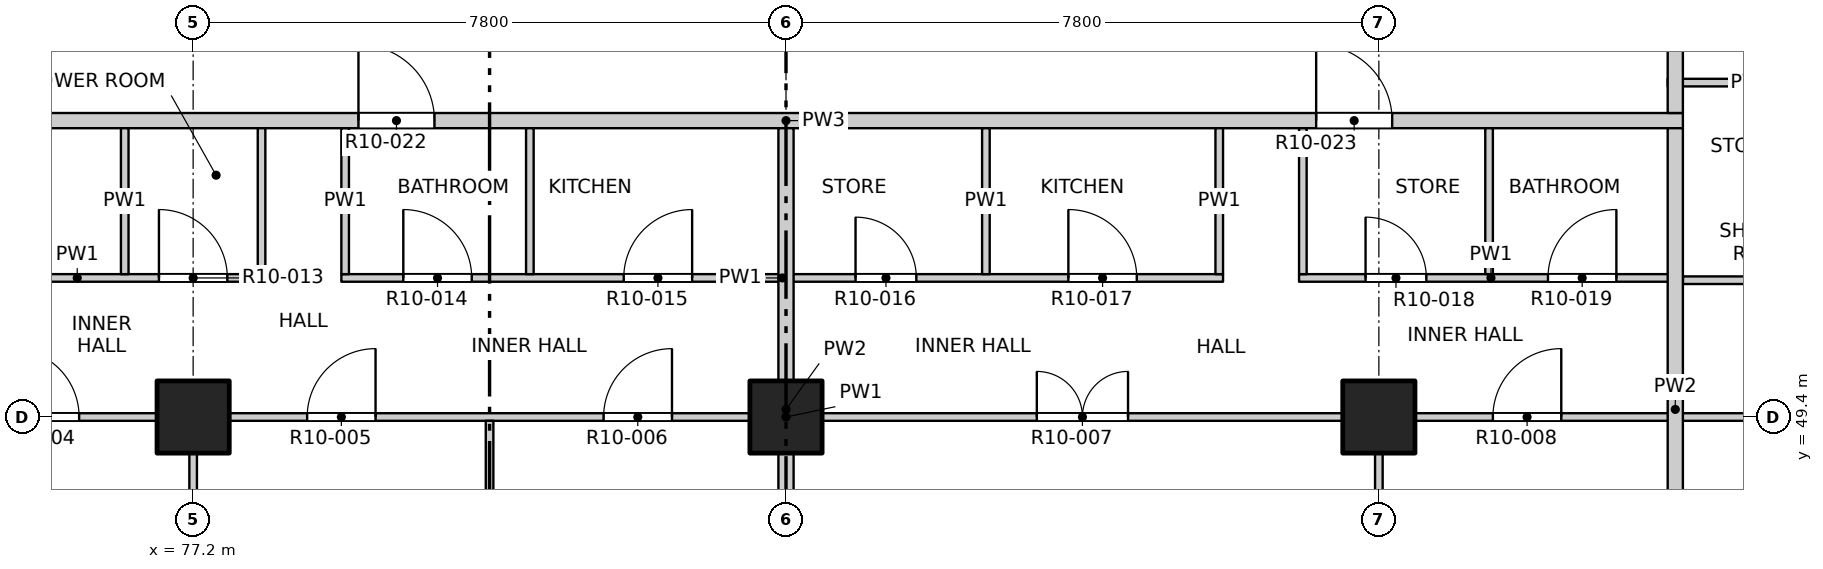
"""IFC4 building model, lengths in metres.
Left out: names, types, materials, properties, quantities, classifications, styles, units other than length and angle.
Written with IfcOpenShell. Run it as: python <this file> out.ifc"""

import sys

from ifc_helpers import new_model, si_unit, direction, frame, frame_2d, origin, origin_2d, place, context, subcontext, project, spatial, rectangle, extrude, element, fill, save


model = new_model("IFC4")
c1 = context("Model", 3, precision=1e-05, world=origin(), true_north=direction((0.0, 1.0)))
c2 = subcontext(c1, "Body", "Model", "MODEL_VIEW")
j1 = project(units=[si_unit("LENGTHUNIT", "METRE"), si_unit("PLANEANGLEUNIT", "RADIAN")], contexts=[c1])
p1 = place(None, origin())
s1 = spatial("IfcSite", under=j1, at=p1, CompositionType="ELEMENT")
p2 = place(p1, origin())
s2 = spatial("IfcBuilding", under=s1, at=p2, CompositionType="ELEMENT")
p3 = place(p2, frame((0.0, 0.0, 123.7)))
s3 = spatial("IfcBuildingStorey", under=s2, at=p3, CompositionType="ELEMENT", Elevation=123.7)
for number, where, z_axis, x_axis in (
    (1, (77.2, 49.4, -0.3), (0.0, 0.0, 1.0), (1.0, 0.0, 0.0)),
    (2, (85.0, 49.4, -0.3), (0.0, 0.0, 1.0), (1.0, 0.0, 0.0)),
    (3, (92.8, 49.4, -0.3), (0.0, 0.0, 1.0), (1.0, 0.0, 0.0)),
):
    element("IfcColumn", number, at=place(p3, frame(where, z_axis=z_axis, x_axis=x_axis)), inside=s3, PredefinedType="COLUMN", context=c2, shape_type="SweptSolid", body=[
        extrude(rectangle(XDim=0.95, YDim=0.95, at=origin_2d()), origin(), (0.0, 0.0, 1.0), 3.45),
    ])
p4 = place(p3, frame((65.8, 49.4, 0.0), z_axis=(0.0, 0.0, 1.0), x_axis=(1.0, 0.0, 0.0)))
e4 = element("IfcWall", 4, at=p4, inside=s3, PredefinedType="PARTITIONING", context=c2, shape_type="SweptSolid", body=[
    extrude(rectangle(XDim=38.4, YDim=0.1, at=frame_2d((19.2, 0.0))), origin(), (0.0, 0.0, 1.0), 3.15),
])
p5 = place(p4, frame((4.19, 0.0, 0.0)))
e5 = element("IfcOpeningElement", 5, at=p5, cuts=e4, PredefinedType="OPENING", context=c2, shape_type="SweptSolid", body=[
    extrude(rectangle(XDim=0.9, YDim=2.1, at=frame_2d((0.45, 1.05))), frame((0.0, 0.06, 0.0), z_axis=(0.0, -1.0, 0.0), x_axis=(1.0, 0.0, 0.0)), (0.0, 0.0, 1.0), 0.12),
])
p6 = place(p4, frame((9.0, 0.0, 0.0)))
e6 = element("IfcOpeningElement", 6, at=p6, cuts=e4, PredefinedType="OPENING", context=c2, shape_type="SweptSolid", body=[
    extrude(rectangle(XDim=0.9, YDim=2.1, at=frame_2d((0.45, 1.05))), frame((0.0, 0.06, 0.0), z_axis=(0.0, -1.0, 0.0), x_axis=(1.0, 0.0, 0.0)), (0.0, 0.0, 1.0), 0.12),
])
p7 = place(p4, frame((12.9, 0.0, 0.0)))
e7 = element("IfcOpeningElement", 7, at=p7, cuts=e4, PredefinedType="OPENING", context=c2, shape_type="SweptSolid", body=[
    extrude(rectangle(XDim=0.9, YDim=2.1, at=frame_2d((0.45, 1.05))), frame((0.0, 0.06, 0.0), z_axis=(0.0, -1.0, 0.0), x_axis=(1.0, 0.0, 0.0)), (0.0, 0.0, 1.0), 0.12),
])
p8 = place(p4, frame((16.8, 0.0, 0.0)))
e8 = element("IfcOpeningElement", 8, at=p8, cuts=e4, PredefinedType="OPENING", context=c2, shape_type="SweptSolid", body=[
    extrude(rectangle(XDim=0.9, YDim=2.1, at=frame_2d((0.45, 1.05))), frame((0.0, 0.06, 0.0), z_axis=(0.0, -1.0, 0.0), x_axis=(1.0, 0.0, 0.0)), (0.0, 0.0, 1.0), 0.12),
])
p9 = place(p4, frame((22.5, 0.0, 0.0)))
e9 = element("IfcOpeningElement", 9, at=p9, cuts=e4, PredefinedType="OPENING", context=c2, shape_type="SweptSolid", body=[
    extrude(rectangle(XDim=1.2, YDim=2.1, at=frame_2d((0.6, 1.05))), frame((0.0, 0.06, 0.0), z_axis=(0.0, -1.0, 0.0), x_axis=(1.0, 0.0, 0.0)), (0.0, 0.0, 1.0), 0.12),
])
p10 = place(p4, frame((28.5, 0.0, 0.0)))
e10 = element("IfcOpeningElement", 10, at=p10, cuts=e4, PredefinedType="OPENING", context=c2, shape_type="SweptSolid", body=[
    extrude(rectangle(XDim=0.9, YDim=2.1, at=frame_2d((0.45, 1.05))), frame((0.0, 0.06, 0.0), z_axis=(0.0, -1.0, 0.0), x_axis=(1.0, 0.0, 0.0)), (0.0, 0.0, 1.0), 0.12),
])
p11 = place(p4, frame((33.31, 0.0, 0.0)))
e11 = element("IfcOpeningElement", 11, at=p11, cuts=e4, PredefinedType="OPENING", context=c2, shape_type="SweptSolid", body=[
    extrude(rectangle(XDim=0.9, YDim=2.1, at=frame_2d((0.45, 1.05))), frame((0.0, 0.06, 0.0), z_axis=(0.0, -1.0, 0.0), x_axis=(1.0, 0.0, 0.0)), (0.0, 0.0, 1.0), 0.12),
])
p12 = place(p3, frame((96.8, 51.2, 0.0), z_axis=(0.0, 0.0, 1.0), x_axis=(1.0, 0.0, 0.0)))
e12 = element("IfcWall", 12, at=p12, inside=s3, PredefinedType="PARTITIONING", context=c2, shape_type="SweptSolid", body=[
    extrude(rectangle(XDim=2.02, YDim=0.1, at=frame_2d((1.01, 0.0))), origin(), (0.0, 0.0, 1.0), 3.15),
])
p13 = place(p3, frame((73.2, 51.23, 0.0), z_axis=(0.0, 0.0, 1.0), x_axis=(1.0, 0.0, 0.0)))
e13 = element("IfcWall", 13, at=p13, inside=s3, PredefinedType="PARTITIONING", context=c2, shape_type="SweptSolid", body=[
    extrude(rectangle(XDim=4.95, YDim=0.1, at=frame_2d((2.475, 0.0))), origin(), (0.0, 0.0, 1.0), 3.15),
])
p14 = place(p13, frame((1.2, 0.0, 0.0)))
e14 = element("IfcOpeningElement", 14, at=p14, cuts=e13, PredefinedType="OPENING", context=c2, shape_type="SweptSolid", body=[
    extrude(rectangle(XDim=0.8, YDim=2.1, at=frame_2d((0.4, 1.05))), frame((0.0, 0.06, 0.0), z_axis=(0.0, -1.0, 0.0), x_axis=(1.0, 0.0, 0.0)), (0.0, 0.0, 1.0), 0.12),
])
p15 = place(p13, frame((3.55, 0.0, 0.0)))
e15 = element("IfcOpeningElement", 15, at=p15, cuts=e13, PredefinedType="OPENING", context=c2, shape_type="SweptSolid", body=[
    extrude(rectangle(XDim=0.9, YDim=2.1, at=frame_2d((0.45, 1.05))), frame((0.0, 0.06, 0.0), z_axis=(0.0, -1.0, 0.0), x_axis=(1.0, 0.0, 0.0)), (0.0, 0.0, 1.0), 0.12),
])
p16 = place(p3, frame((79.15, 51.23, 0.0), z_axis=(0.0, 0.0, 1.0), x_axis=(1.0, 0.0, 0.0)))
e16 = element("IfcWall", 16, at=p16, inside=s3, PredefinedType="PARTITIONING", context=c2, shape_type="SweptSolid", body=[
    extrude(rectangle(XDim=11.6, YDim=0.1, at=frame_2d((5.8, 0.0))), origin(), (0.0, 0.0, 1.0), 3.15),
])
p17 = place(p16, frame((0.815, 0.0, 0.0)))
e17 = element("IfcOpeningElement", 17, at=p17, cuts=e16, PredefinedType="OPENING", context=c2, shape_type="SweptSolid", body=[
    extrude(rectangle(XDim=0.9, YDim=2.1, at=frame_2d((0.45, 1.05))), frame((0.0, 0.06, 0.0), z_axis=(0.0, -1.0, 0.0), x_axis=(1.0, 0.0, 0.0)), (0.0, 0.0, 1.0), 0.12),
])
p18 = place(p16, frame((3.715, 0.0, 0.0)))
e18 = element("IfcOpeningElement", 18, at=p18, cuts=e16, PredefinedType="OPENING", context=c2, shape_type="SweptSolid", body=[
    extrude(rectangle(XDim=0.9, YDim=2.1, at=frame_2d((0.45, 1.05))), frame((0.0, 0.06, 0.0), z_axis=(0.0, -1.0, 0.0), x_axis=(1.0, 0.0, 0.0)), (0.0, 0.0, 1.0), 0.12),
])
p19 = place(p16, frame((6.765, 0.0, 0.0)))
e19 = element("IfcOpeningElement", 19, at=p19, cuts=e16, PredefinedType="OPENING", context=c2, shape_type="SweptSolid", body=[
    extrude(rectangle(XDim=0.8, YDim=2.1, at=frame_2d((0.4, 1.05))), frame((0.0, 0.06, 0.0), z_axis=(0.0, -1.0, 0.0), x_axis=(1.0, 0.0, 0.0)), (0.0, 0.0, 1.0), 0.12),
])
p20 = place(p16, frame((9.565, 0.0, 0.0)))
e20 = element("IfcOpeningElement", 20, at=p20, cuts=e16, PredefinedType="OPENING", context=c2, shape_type="SweptSolid", body=[
    extrude(rectangle(XDim=0.9, YDim=2.1, at=frame_2d((0.45, 1.05))), frame((0.0, 0.06, 0.0), z_axis=(0.0, -1.0, 0.0), x_axis=(1.0, 0.0, 0.0)), (0.0, 0.0, 1.0), 0.12),
])
p21 = place(p3, frame((91.75, 51.23, 0.0), z_axis=(0.0, 0.0, 1.0), x_axis=(1.0, 0.0, 0.0)))
e21 = element("IfcWall", 21, at=p21, inside=s3, PredefinedType="PARTITIONING", context=c2, shape_type="SweptSolid", body=[
    extrude(rectangle(XDim=5.05, YDim=0.1, at=frame_2d((2.525, 0.0))), origin(), (0.0, 0.0, 1.0), 3.15),
])
p22 = place(p21, frame((0.875, 0.0, 0.0)))
e22 = element("IfcOpeningElement", 22, at=p22, cuts=e21, PredefinedType="OPENING", context=c2, shape_type="SweptSolid", body=[
    extrude(rectangle(XDim=0.8, YDim=2.1, at=frame_2d((0.4, 1.05))), frame((0.0, 0.06, 0.0), z_axis=(0.0, -1.0, 0.0), x_axis=(1.0, 0.0, 0.0)), (0.0, 0.0, 1.0), 0.12),
])
p23 = place(p21, frame((3.275, 0.0, 0.0)))
e23 = element("IfcOpeningElement", 23, at=p23, cuts=e21, PredefinedType="OPENING", context=c2, shape_type="SweptSolid", body=[
    extrude(rectangle(XDim=0.9, YDim=2.1, at=frame_2d((0.45, 1.05))), frame((0.0, 0.06, 0.0), z_axis=(0.0, -1.0, 0.0), x_axis=(1.0, 0.0, 0.0)), (0.0, 0.0, 1.0), 0.12),
])
p24 = place(p3, frame((73.2, 53.3, 0.0), z_axis=(0.0, 0.0, 1.0), x_axis=(1.0, 0.0, 0.0)))
e24 = element("IfcWall", 24, at=p24, inside=s3, PredefinedType="PARTITIONING", context=c2, shape_type="SweptSolid", body=[
    extrude(rectangle(XDim=23.6, YDim=0.2, at=frame_2d((11.8, 0.0))), origin(), (0.0, 0.0, 1.0), 3.15),
])
p25 = place(p24, frame((6.175, 0.0, 0.0)))
e25 = element("IfcOpeningElement", 25, at=p25, cuts=e24, PredefinedType="OPENING", context=c2, shape_type="SweptSolid", body=[
    extrude(rectangle(XDim=1.0, YDim=2.1, at=frame_2d((0.5, 1.05))), frame((0.0, 0.11, 0.0), z_axis=(0.0, -1.0, 0.0), x_axis=(1.0, 0.0, 0.0)), (0.0, 0.0, 1.0), 0.22),
])
p26 = place(p24, frame((18.775, 0.0, 0.0)))
e26 = element("IfcOpeningElement", 26, at=p26, cuts=e24, PredefinedType="OPENING", context=c2, shape_type="SweptSolid", body=[
    extrude(rectangle(XDim=1.0, YDim=2.1, at=frame_2d((0.5, 1.05))), frame((0.0, 0.11, 0.0), z_axis=(0.0, -1.0, 0.0), x_axis=(1.0, 0.0, 0.0)), (0.0, 0.0, 1.0), 0.22),
])
p27 = place(p3, frame((96.6, 53.8, 0.0), z_axis=(0.0, 0.0, 1.0), x_axis=(1.0, 0.0, 0.0)))
e27 = element("IfcWall", 27, at=p27, inside=s3, PredefinedType="PARTITIONING", context=c2, shape_type="SweptSolid", body=[
    extrude(rectangle(XDim=2.22, YDim=0.1, at=frame_2d((1.11, 0.0))), origin(), (0.0, 0.0, 1.0), 3.15),
])
p28 = place(p3, frame((76.3, 51.28, 0.0), z_axis=(0.0, 0.0, 1.0), x_axis=(0.0, 1.0, 0.0)))
e28 = element("IfcWall", 28, at=p28, inside=s3, PredefinedType="PARTITIONING", context=c2, shape_type="SweptSolid", body=[
    extrude(rectangle(XDim=1.92, YDim=0.1, at=frame_2d((0.96, 0.0))), origin(), (0.0, 0.0, 1.0), 3.15),
])
p29 = place(p3, frame((77.2, 45.8, 0.0), z_axis=(0.0, 0.0, 1.0), x_axis=(0.0, 1.0, 0.0)))
e29 = element("IfcWall", 29, at=p29, inside=s3, PredefinedType="PARTITIONING", context=c2, shape_type="SweptSolid", body=[
    extrude(rectangle(XDim=3.55, YDim=0.1, at=frame_2d((1.775, 0.0))), origin(), (0.0, 0.0, 1.0), 3.15),
])
for number, where, z_axis, x_axis in (
    (30, (78.1, 51.28, 0.0), (0.0, 0.0, 1.0), (0.0, 1.0, 0.0)),
    (31, (79.2, 51.28, 0.0), (0.0, 0.0, 1.0), (0.0, 1.0, 0.0)),
):
    element("IfcWall", number, at=place(p3, frame(where, z_axis=z_axis, x_axis=x_axis)), inside=s3, PredefinedType="PARTITIONING", context=c2, shape_type="SweptSolid", body=[
        extrude(rectangle(XDim=1.92, YDim=0.1, at=frame_2d((0.96, 0.0))), origin(), (0.0, 0.0, 1.0), 3.15),
    ])
p30 = place(p3, frame((81.1, 45.8, 0.0), z_axis=(0.0, 0.0, 1.0), x_axis=(0.0, 1.0, 0.0)))
e32 = element("IfcWall", 32, at=p30, inside=s3, PredefinedType="PARTITIONING", context=c2, shape_type="SweptSolid", body=[
    extrude(rectangle(XDim=3.55, YDim=0.1, at=frame_2d((1.775, 0.0))), origin(), (0.0, 0.0, 1.0), 3.15),
])
p31 = place(p3, frame((81.63, 51.28, 0.0), z_axis=(0.0, 0.0, 1.0), x_axis=(0.0, 1.0, 0.0)))
e33 = element("IfcWall", 33, at=p31, inside=s3, PredefinedType="PARTITIONING", context=c2, shape_type="SweptSolid", body=[
    extrude(rectangle(XDim=1.92, YDim=0.1, at=frame_2d((0.96, 0.0))), origin(), (0.0, 0.0, 1.0), 3.15),
])
p32 = place(p3, frame((85.0, 45.8, 0.0), z_axis=(0.0, 0.0, 1.0), x_axis=(0.0, 1.0, 0.0)))
e34 = element("IfcWall", 34, at=p32, inside=s3, PredefinedType="PARTITIONING", context=c2, shape_type="SweptSolid", body=[
    extrude(rectangle(XDim=7.4, YDim=0.2, at=frame_2d((3.7, 0.0))), origin(), (0.0, 0.0, 1.0), 3.15),
])
for number, where, z_axis, x_axis in (
    (35, (87.63, 51.28, 0.0), (0.0, 0.0, 1.0), (0.0, 1.0, 0.0)),
    (36, (90.7, 51.28, 0.0), (0.0, 0.0, 1.0), (0.0, 1.0, 0.0)),
    (37, (91.8, 51.28, 0.0), (0.0, 0.0, 1.0), (0.0, 1.0, 0.0)),
):
    element("IfcWall", number, at=place(p3, frame(where, z_axis=z_axis, x_axis=x_axis)), inside=s3, PredefinedType="PARTITIONING", context=c2, shape_type="SweptSolid", body=[
        extrude(rectangle(XDim=1.92, YDim=0.1, at=frame_2d((0.96, 0.0))), origin(), (0.0, 0.0, 1.0), 3.15),
    ])
p33 = place(p3, frame((92.8, 45.8, 0.0), z_axis=(0.0, 0.0, 1.0), x_axis=(0.0, 1.0, 0.0)))
e38 = element("IfcWall", 38, at=p33, inside=s3, PredefinedType="PARTITIONING", context=c2, shape_type="SweptSolid", body=[
    extrude(rectangle(XDim=3.55, YDim=0.1, at=frame_2d((1.775, 0.0))), origin(), (0.0, 0.0, 1.0), 3.15),
])
p34 = place(p3, frame((94.25, 51.28, 0.0), z_axis=(0.0, 0.0, 1.0), x_axis=(0.0, 1.0, 0.0)))
e39 = element("IfcWall", 39, at=p34, inside=s3, PredefinedType="PARTITIONING", context=c2, shape_type="SweptSolid", body=[
    extrude(rectangle(XDim=1.92, YDim=0.1, at=frame_2d((0.96, 0.0))), origin(), (0.0, 0.0, 1.0), 3.15),
])
p35 = place(p3, frame((96.7, 45.8, 0.0), z_axis=(0.0, 0.0, 1.0), x_axis=(0.0, 1.0, 0.0)))
e40 = element("IfcWall", 40, at=p35, inside=s3, PredefinedType="PARTITIONING", context=c2, shape_type="SweptSolid", body=[
    extrude(rectangle(XDim=7.4, YDim=0.2, at=frame_2d((3.7, 0.0))), origin(), (0.0, 0.0, 1.0), 3.15),
])
p36 = place(p3, frame((96.7, 53.4, 0.0), z_axis=(0.0, 0.0, 1.0), x_axis=(0.0, 1.0, 0.0)))
e41 = element("IfcWall", 41, at=p36, inside=s3, PredefinedType="PARTITIONING", context=c2, shape_type="SweptSolid", body=[
    extrude(rectangle(XDim=30.8, YDim=0.2, at=frame_2d((15.4, 0.0))), origin(), (0.0, 0.0, 1.0), 3.15),
])
p37 = place(p36, frame((9.725, 0.0, 0.0)))
e42 = element("IfcOpeningElement", 42, at=p37, cuts=e41, PredefinedType="OPENING", context=c2, shape_type="SweptSolid", body=[
    extrude(rectangle(XDim=1.0, YDim=2.1, at=frame_2d((0.5, 1.05))), frame((0.0, 0.11, 0.0), z_axis=(0.0, -1.0, 0.0), x_axis=(1.0, 0.0, 0.0)), (0.0, 0.0, 1.0), 0.22),
])
p38 = place(p36, frame((14.775, 0.0, 0.0)))
e43 = element("IfcOpeningElement", 43, at=p38, cuts=e41, PredefinedType="OPENING", context=c2, shape_type="SweptSolid", body=[
    extrude(rectangle(XDim=1.0, YDim=2.1, at=frame_2d((0.5, 1.05))), frame((0.0, 0.11, 0.0), z_axis=(0.0, -1.0, 0.0), x_axis=(1.0, 0.0, 0.0)), (0.0, 0.0, 1.0), 0.22),
])
p39 = place(p6, origin())
e44 = element("IfcDoor", 44, at=p39, inside=s3, OperationType="SINGLE_SWING_LEFT", PredefinedType="DOOR", context=c2, shape_type="SweptSolid", body=[
    extrude(rectangle(XDim=0.9, YDim=2.1, at=frame_2d((0.45, 1.05))), frame((0.0, 0.025, 0.0), z_axis=(0.0, -1.0, 0.0), x_axis=(1.0, 0.0, 0.0)), (0.0, 0.0, 1.0), 0.05),
])
fill(e6, e44)
p40 = place(p7, origin())
e45 = element("IfcDoor", 45, at=p40, inside=s3, OperationType="SINGLE_SWING_RIGHT", PredefinedType="DOOR", context=c2, shape_type="SweptSolid", body=[
    extrude(rectangle(XDim=0.9, YDim=2.1, at=frame_2d((0.45, 1.05))), frame((0.0, 0.025, 0.0), z_axis=(0.0, -1.0, 0.0), x_axis=(1.0, 0.0, 0.0)), (0.0, 0.0, 1.0), 0.05),
])
fill(e7, e45)
p41 = place(p8, origin())
e46 = element("IfcDoor", 46, at=p41, inside=s3, OperationType="SINGLE_SWING_RIGHT", PredefinedType="DOOR", context=c2, shape_type="SweptSolid", body=[
    extrude(rectangle(XDim=0.9, YDim=2.1, at=frame_2d((0.45, 1.05))), frame((0.0, 0.025, 0.0), z_axis=(0.0, -1.0, 0.0), x_axis=(1.0, 0.0, 0.0)), (0.0, 0.0, 1.0), 0.05),
])
fill(e8, e46)
p42 = place(p9, origin())
e47 = element("IfcDoor", 47, at=p42, inside=s3, OperationType="DOUBLE_DOOR_SINGLE_SWING", PredefinedType="DOOR", context=c2, shape_type="SweptSolid", body=[
    extrude(rectangle(XDim=1.2, YDim=2.1, at=frame_2d((0.6, 1.05))), frame((0.0, 0.025, 0.0), z_axis=(0.0, -1.0, 0.0), x_axis=(1.0, 0.0, 0.0)), (0.0, 0.0, 1.0), 0.05),
])
fill(e9, e47)
p43 = place(p10, origin())
e48 = element("IfcDoor", 48, at=p43, inside=s3, OperationType="SINGLE_SWING_RIGHT", PredefinedType="DOOR", context=c2, shape_type="SweptSolid", body=[
    extrude(rectangle(XDim=0.9, YDim=2.1, at=frame_2d((0.45, 1.05))), frame((0.0, 0.025, 0.0), z_axis=(0.0, -1.0, 0.0), x_axis=(1.0, 0.0, 0.0)), (0.0, 0.0, 1.0), 0.05),
])
fill(e10, e48)
p44 = place(p15, origin())
e49 = element("IfcDoor", 49, at=p44, inside=s3, OperationType="SINGLE_SWING_LEFT", PredefinedType="DOOR", context=c2, shape_type="SweptSolid", body=[
    extrude(rectangle(XDim=0.9, YDim=2.1, at=frame_2d((0.45, 1.05))), frame((0.0, 0.025, 0.0), z_axis=(0.0, -1.0, 0.0), x_axis=(1.0, 0.0, 0.0)), (0.0, 0.0, 1.0), 0.05),
])
fill(e15, e49)
p45 = place(p17, origin())
e50 = element("IfcDoor", 50, at=p45, inside=s3, OperationType="SINGLE_SWING_LEFT", PredefinedType="DOOR", context=c2, shape_type="SweptSolid", body=[
    extrude(rectangle(XDim=0.9, YDim=2.1, at=frame_2d((0.45, 1.05))), frame((0.0, 0.025, 0.0), z_axis=(0.0, -1.0, 0.0), x_axis=(1.0, 0.0, 0.0)), (0.0, 0.0, 1.0), 0.05),
])
fill(e17, e50)
p46 = place(p18, origin())
e51 = element("IfcDoor", 51, at=p46, inside=s3, OperationType="SINGLE_SWING_RIGHT", PredefinedType="DOOR", context=c2, shape_type="SweptSolid", body=[
    extrude(rectangle(XDim=0.9, YDim=2.1, at=frame_2d((0.45, 1.05))), frame((0.0, 0.025, 0.0), z_axis=(0.0, -1.0, 0.0), x_axis=(1.0, 0.0, 0.0)), (0.0, 0.0, 1.0), 0.05),
])
fill(e18, e51)
p47 = place(p19, origin())
e52 = element("IfcDoor", 52, at=p47, inside=s3, OperationType="SINGLE_SWING_LEFT", PredefinedType="DOOR", context=c2, shape_type="SweptSolid", body=[
    extrude(rectangle(XDim=0.8, YDim=2.1, at=frame_2d((0.4, 1.05))), frame((0.0, 0.025, 0.0), z_axis=(0.0, -1.0, 0.0), x_axis=(1.0, 0.0, 0.0)), (0.0, 0.0, 1.0), 0.05),
])
fill(e19, e52)
p48 = place(p20, origin())
e53 = element("IfcDoor", 53, at=p48, inside=s3, OperationType="SINGLE_SWING_LEFT", PredefinedType="DOOR", context=c2, shape_type="SweptSolid", body=[
    extrude(rectangle(XDim=0.9, YDim=2.1, at=frame_2d((0.45, 1.05))), frame((0.0, 0.025, 0.0), z_axis=(0.0, -1.0, 0.0), x_axis=(1.0, 0.0, 0.0)), (0.0, 0.0, 1.0), 0.05),
])
fill(e20, e53)
p49 = place(p22, origin())
e54 = element("IfcDoor", 54, at=p49, inside=s3, OperationType="SINGLE_SWING_LEFT", PredefinedType="DOOR", context=c2, shape_type="SweptSolid", body=[
    extrude(rectangle(XDim=0.8, YDim=2.1, at=frame_2d((0.4, 1.05))), frame((0.0, 0.025, 0.0), z_axis=(0.0, -1.0, 0.0), x_axis=(1.0, 0.0, 0.0)), (0.0, 0.0, 1.0), 0.05),
])
fill(e22, e54)
p50 = place(p23, origin())
e55 = element("IfcDoor", 55, at=p50, inside=s3, OperationType="SINGLE_SWING_RIGHT", PredefinedType="DOOR", context=c2, shape_type="SweptSolid", body=[
    extrude(rectangle(XDim=0.9, YDim=2.1, at=frame_2d((0.45, 1.05))), frame((0.0, 0.025, 0.0), z_axis=(0.0, -1.0, 0.0), x_axis=(1.0, 0.0, 0.0)), (0.0, 0.0, 1.0), 0.05),
])
fill(e23, e55)
p51 = place(p25, origin())
e56 = element("IfcDoor", 56, at=p51, inside=s3, OperationType="SINGLE_SWING_LEFT", PredefinedType="DOOR", context=c2, shape_type="SweptSolid", body=[
    extrude(rectangle(XDim=1.0, YDim=2.1, at=frame_2d((0.5, 1.05))), frame((0.0, 0.025, 0.0), z_axis=(0.0, -1.0, 0.0), x_axis=(1.0, 0.0, 0.0)), (0.0, 0.0, 1.0), 0.05),
])
fill(e25, e56)
p52 = place(p26, origin())
e57 = element("IfcDoor", 57, at=p52, inside=s3, OperationType="SINGLE_SWING_LEFT", PredefinedType="DOOR", context=c2, shape_type="SweptSolid", body=[
    extrude(rectangle(XDim=1.0, YDim=2.1, at=frame_2d((0.5, 1.05))), frame((0.0, 0.025, 0.0), z_axis=(0.0, -1.0, 0.0), x_axis=(1.0, 0.0, 0.0)), (0.0, 0.0, 1.0), 0.05),
])
fill(e26, e57)
save(model, sys.argv[1])
